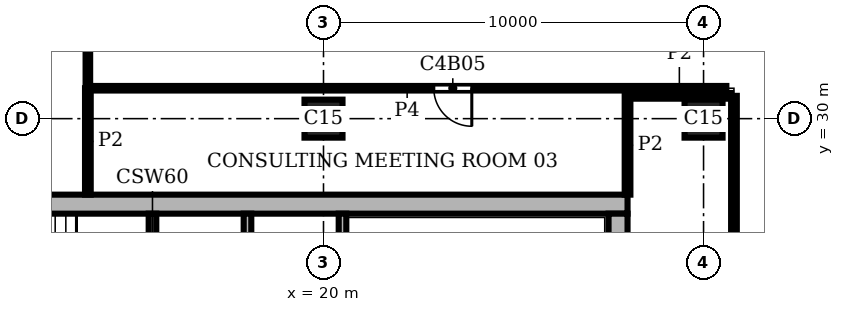
"""IFC4 building model, lengths in metres.
Left out: names, types, materials, properties, quantities, classifications, styles, units other than length and angle.
Written with IfcOpenShell. Run it as: python <this file> out.ifc"""

import sys

from ifc_helpers import new_model, si_unit, direction, frame, frame_2d, origin, origin_2d, place, context, subcontext, project, spatial, rectangle, extrude, element, fill, save


model = new_model("IFC4")
c1 = context("Model", 3, precision=1e-05, world=origin(), true_north=direction((0.0, 1.0)))
c2 = subcontext(c1, "Body", "Model", "MODEL_VIEW")
j1 = project(units=[si_unit("LENGTHUNIT", "METRE"), si_unit("PLANEANGLEUNIT", "RADIAN")], contexts=[c1])
p1 = place(None, origin())
s1 = spatial("IfcSite", under=j1, at=p1, CompositionType="ELEMENT")
p2 = place(p1, origin())
s2 = spatial("IfcBuilding", under=s1, at=p2, CompositionType="ELEMENT")
p3 = place(p2, frame((0.0, 0.0, 282.6)))
s3 = spatial("IfcBuildingStorey", under=s2, at=p3, CompositionType="ELEMENT", Elevation=282.6)
for number, where, z_axis, x_axis in (
    (1, (20.0, 30.0, 0.0), (0.0, 0.0, 1.0), (1.0, 0.0, 0.0)),
    (2, (30.0, 30.0, 0.0), (0.0, 0.0, 1.0), (1.0, 0.0, 0.0)),
):
    element("IfcColumn", number, at=place(p3, frame(where, z_axis=z_axis, x_axis=x_axis)), inside=s3, PredefinedType="COLUMN", context=c2, shape_type="SweptSolid", body=[
        extrude(rectangle(XDim=1.0, YDim=1.0, at=origin_2d()), origin(), (0.0, 0.0, 1.0), 3.9),
    ])
p4 = place(p3, frame((27.75, 8.5, 0.0), z_axis=(0.0, 0.0, 1.0), x_axis=(0.0, 1.0, 0.0)))
e3 = element("IfcWall", 3, at=p4, inside=s3, PredefinedType="SHEAR", context=c2, shape_type="SweptSolid", body=[
    extrude(rectangle(XDim=19.0, YDim=0.5, at=frame_2d((9.5, 0.0))), origin(), (0.0, 0.0, 1.0), 3.9),
])
p5 = place(p4, frame((4.95, 0.0, 0.0)))
e4 = element("IfcOpeningElement", 4, at=p5, cuts=e3, PredefinedType="OPENING", context=c2, shape_type="SweptSolid", body=[
    extrude(rectangle(XDim=1.6, YDim=2.1, at=frame_2d((0.8, 1.05))), frame((0.0, 0.26, 0.0), z_axis=(0.0, -1.0, 0.0), x_axis=(1.0, 0.0, 0.0)), (0.0, 0.0, 1.0), 0.52),
])
p6 = place(p3, frame((28.0, 27.75, 0.0), z_axis=(0.0, 0.0, 1.0), x_axis=(-1.0, 0.0, 0.0)))
e5 = element("IfcWall", 5, at=p6, inside=s3, PredefinedType="SHEAR", context=c2, shape_type="SweptSolid", body=[
    extrude(rectangle(XDim=20.0, YDim=0.5, at=frame_2d((10.0, 0.0))), origin(), (0.0, 0.0, 1.0), 3.9),
])
p7 = place(p3, frame((15.5, 23.6, 0.0), z_axis=(0.0, 0.0, 1.0), x_axis=(0.0, 1.0, 0.0)))
e6 = element("IfcWall", 6, at=p7, inside=s3, PredefinedType="SHEAR", context=c2, shape_type="SweptSolid", body=[
    extrude(rectangle(XDim=3.9, YDim=0.2, at=frame_2d((1.95, 0.0))), origin(), (0.0, 0.0, 1.0), 3.58),
])
p8 = place(p3, frame((18.0, 20.0, 0.0), z_axis=(0.0, 0.0, 1.0), x_axis=(0.0, 1.0, 0.0)))
e7 = element("IfcWall", 7, at=p8, inside=s3, PredefinedType="SHEAR", context=c2, shape_type="SweptSolid", body=[
    extrude(rectangle(XDim=7.5, YDim=0.2, at=frame_2d((3.75, 0.0))), origin(), (0.0, 0.0, 1.0), 3.58),
])
p9 = place(p8, frame((1.2, 0.0, 0.0)))
e8 = element("IfcOpeningElement", 8, at=p9, cuts=e7, PredefinedType="OPENING", context=c2, shape_type="SweptSolid", body=[
    extrude(rectangle(XDim=1.2, YDim=2.1, at=frame_2d((0.6, 1.05))), frame((0.0, 0.11, 0.0), z_axis=(0.0, -1.0, 0.0), x_axis=(1.0, 0.0, 0.0)), (0.0, 0.0, 1.0), 0.22),
])
p10 = place(p3, frame((20.5, 23.6, 0.0), z_axis=(0.0, 0.0, 1.0), x_axis=(0.0, 1.0, 0.0)))
e9 = element("IfcWall", 9, at=p10, inside=s3, PredefinedType="SHEAR", context=c2, shape_type="SweptSolid", body=[
    extrude(rectangle(XDim=3.9, YDim=0.2, at=frame_2d((1.95, 0.0))), origin(), (0.0, 0.0, 1.0), 3.58),
])
p11 = place(p3, frame((13.8, 28.0, 0.0), z_axis=(0.0, 0.0, 1.0), x_axis=(0.0, 1.0, 0.0)))
e10 = element("IfcWall", 10, at=p11, inside=s3, PredefinedType="PARTITIONING", context=c2, shape_type="SweptSolid", body=[
    extrude(rectangle(XDim=2.801, YDim=0.15, at=frame_2d((1.4, 0.0))), origin(), (0.0, 0.0, 1.0), 3.58),
])
p12 = place(p3, frame((28.0, 28.0, 0.0), z_axis=(0.0, 0.0, 1.0), x_axis=(0.0, 1.0, 0.0)))
e11 = element("IfcWall", 11, at=p12, inside=s3, PredefinedType="PARTITIONING", context=c2, shape_type="SweptSolid", body=[
    extrude(rectangle(XDim=2.598, YDim=0.15, at=frame_2d((1.299, 0.0))), origin(), (0.0, 0.0, 1.0), 3.58),
])
p13 = place(p3, frame((30.8, 15.45, 0.0), z_axis=(0.0, 0.0, 1.0), x_axis=(0.0, 1.0, 0.0)))
e12 = element("IfcWall", 12, at=p13, inside=s3, PredefinedType="PARTITIONING", context=c2, shape_type="SweptSolid", body=[
    extrude(rectangle(XDim=15.15, YDim=0.15, at=frame_2d((7.575, 0.0))), origin(), (0.0, 0.0, 1.0), 3.58),
])
p14 = place(p13, frame((6.35, 0.0, 0.0)))
e13 = element("IfcOpeningElement", 13, at=p14, cuts=e12, PredefinedType="OPENING", context=c2, shape_type="SweptSolid", body=[
    extrude(rectangle(XDim=1.0, YDim=2.1, at=frame_2d((0.5, 1.05))), frame((0.0, 0.085, 0.0), z_axis=(0.0, -1.0, 0.0), x_axis=(1.0, 0.0, 0.0)), (0.0, 0.0, 1.0), 0.17),
])
p15 = place(p3, frame((28.002, 30.6, 0.0), z_axis=(0.0, 0.0, 1.0), x_axis=(1.0, 0.0, 0.0)))
e14 = element("IfcWall", 14, at=p15, inside=s3, PredefinedType="PARTITIONING", context=c2, shape_type="SweptSolid", body=[
    extrude(rectangle(XDim=2.723, YDim=0.15, at=frame_2d((1.362, 0.0))), origin(), (0.0, 0.0, 1.0), 3.58),
])
p16 = place(p3, frame((13.8, 30.8, 0.0), z_axis=(0.0, 0.0, 1.0), x_axis=(0.0, 1.0, 0.0)))
e15 = element("IfcWall", 15, at=p16, inside=s3, PredefinedType="PARTITIONING", context=c2, shape_type="SweptSolid", body=[
    extrude(rectangle(XDim=26.8, YDim=0.12, at=frame_2d((13.4, 0.0))), origin(), (0.0, 0.0, 1.0), 3.58),
])
p17 = place(p16, frame((9.1, 0.0, 0.0)))
e16 = element("IfcOpeningElement", 16, at=p17, cuts=e15, PredefinedType="OPENING", context=c2, shape_type="SweptSolid", body=[
    extrude(rectangle(XDim=1.8, YDim=2.1, at=frame_2d((0.9, 1.05))), frame((0.0, 0.07, 0.0), z_axis=(0.0, -1.0, 0.0), x_axis=(1.0, 0.0, 0.0)), (0.0, 0.0, 1.0), 0.14),
])
p18 = place(p3, frame((13.802, 30.8, 0.0), z_axis=(0.0, 0.0, 1.0), x_axis=(1.0, 0.0, 0.0)))
e17 = element("IfcWall", 17, at=p18, inside=s3, PredefinedType="PARTITIONING", context=c2, shape_type="SweptSolid", body=[
    extrude(rectangle(XDim=16.798, YDim=0.12, at=frame_2d((8.399, 0.0))), origin(), (0.0, 0.0, 1.0), 3.58),
])
p19 = place(p18, frame((9.1, 0.0, 0.0)))
e18 = element("IfcOpeningElement", 18, at=p19, cuts=e17, PredefinedType="OPENING", context=c2, shape_type="SweptSolid", body=[
    extrude(rectangle(XDim=1.0, YDim=2.1, at=frame_2d((0.5, 1.05))), frame((0.0, 0.07, 0.0), z_axis=(0.0, -1.0, 0.0), x_axis=(1.0, 0.0, 0.0)), (0.0, 0.0, 1.0), 0.14),
])
p20 = place(p19, frame((1.0, 0.0, 0.0), z_axis=(0.0, 0.0, 1.0), x_axis=(-1.0, 0.0, 0.0)))
e19 = element("IfcDoor", 19, at=p20, inside=s3, OperationType="SINGLE_SWING_LEFT", PredefinedType="DOOR", context=c2, shape_type="SweptSolid", body=[
    extrude(rectangle(XDim=1.0, YDim=2.1, at=frame_2d((0.5, 1.05))), frame((0.0, 0.025, 0.0), z_axis=(0.0, -1.0, 0.0), x_axis=(1.0, 0.0, 0.0)), (0.0, 0.0, 1.0), 0.05),
])
fill(e18, e19)
save(model, sys.argv[1])
